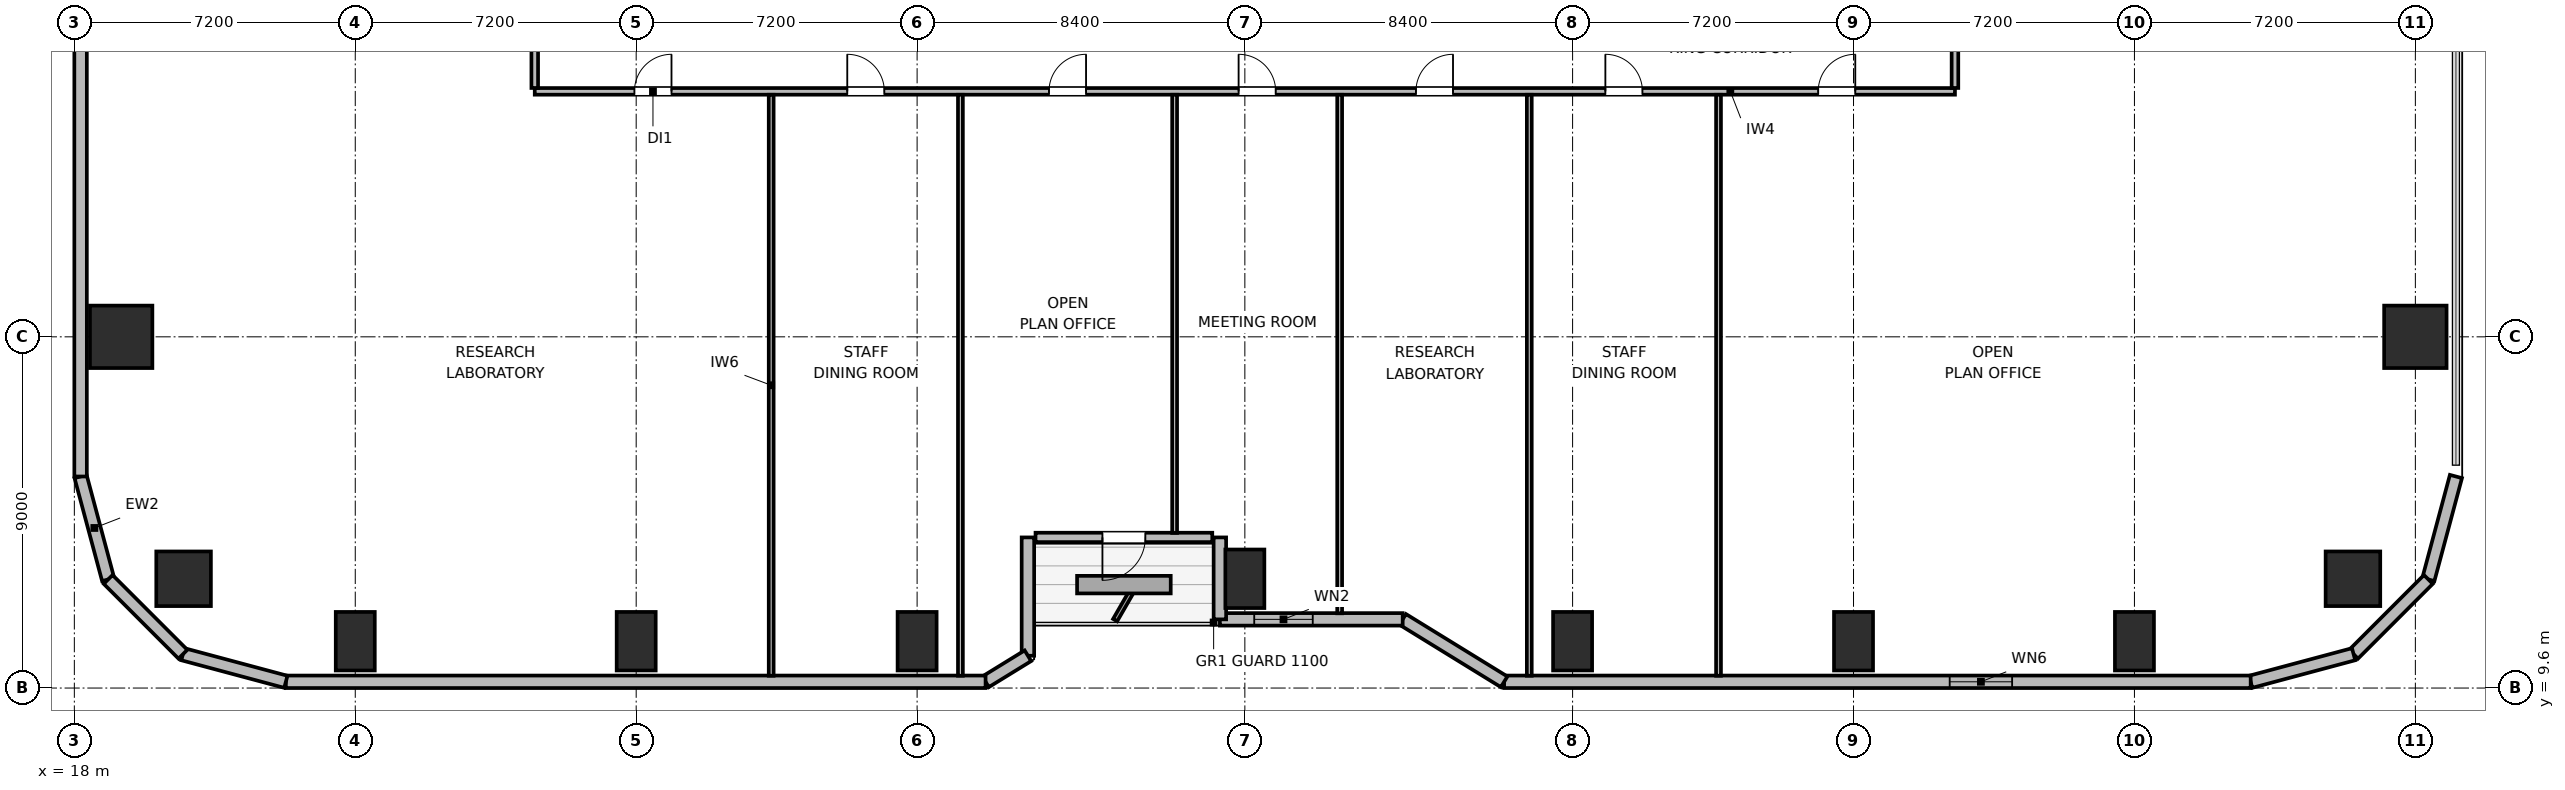
"""IFC4 building model, lengths in metres.
Left out: names, types, materials, properties, quantities, classifications, styles, units other than length and angle.
Written with IfcOpenShell. Run it as: python <this file> out.ifc"""

import sys

from ifc_helpers import new_model, si_unit, direction, frame, frame_2d, origin, origin_2d, place, context, subcontext, project, spatial, rectangle, circle, extrude, element, fill, save


model = new_model("IFC4")
c1 = context("Model", 3, precision=1e-05, world=origin(), true_north=direction((0.0, 1.0)))
c2 = subcontext(c1, "Body", "Model", "MODEL_VIEW")
j1 = project(units=[si_unit("LENGTHUNIT", "METRE"), si_unit("PLANEANGLEUNIT", "RADIAN")], contexts=[c1])
p1 = place(None, origin())
s1 = spatial("IfcSite", under=j1, at=p1, CompositionType="ELEMENT")
p2 = place(p1, origin())
s2 = spatial("IfcBuilding", under=s1, at=p2, CompositionType="ELEMENT")
p3 = place(p2, frame((0.0, 0.0, 48.9)))
s3 = spatial("IfcBuildingStorey", under=s2, at=p3, CompositionType="ELEMENT", Elevation=48.9)
for number, where, z_axis, x_axis in (
    (1, (20.8, 12.4, 0.0), (0.0, 0.0, 1.0), (1.0, 0.0, 0.0)),
    (2, (76.4, 12.4, 0.0), (0.0, 0.0, 1.0), (1.0, 0.0, 0.0)),
):
    element("IfcColumn", number, at=place(p3, frame(where, z_axis=z_axis, x_axis=x_axis)), inside=s3, PredefinedType="COLUMN", context=c2, shape_type="SweptSolid", body=[
        extrude(circle(Radius=0.7, at=origin_2d()), origin(), (0.0, 0.0, 1.0), 3.9),
    ])
for number, where, z_axis, x_axis in (
    (3, (25.2, 10.8, 0.0), (0.0, 0.0, 1.0), (1.0, 0.0, 0.0)),
    (4, (32.4, 10.8, 0.0), (0.0, 0.0, 1.0), (1.0, 0.0, 0.0)),
    (5, (39.6, 10.8, 0.0), (0.0, 0.0, 1.0), (1.0, 0.0, 0.0)),
    (6, (48.0, 12.4, 0.0), (0.0, 0.0, 1.0), (1.0, 0.0, 0.0)),
    (7, (56.4, 10.8, 0.0), (0.0, 0.0, 1.0), (1.0, 0.0, 0.0)),
    (8, (63.6, 10.8, 0.0), (0.0, 0.0, 1.0), (1.0, 0.0, 0.0)),
    (9, (70.8, 10.8, 0.0), (0.0, 0.0, 1.0), (1.0, 0.0, 0.0)),
):
    element("IfcColumn", number, at=place(p3, frame(where, z_axis=z_axis, x_axis=x_axis)), inside=s3, PredefinedType="COLUMN", context=c2, shape_type="SweptSolid", body=[
        extrude(rectangle(XDim=1.0, YDim=1.5, at=origin_2d()), origin(), (0.0, 0.0, 1.0), 3.9),
    ])
for number, where, z_axis, x_axis in (
    (10, (19.2, 18.6, 0.0), (0.0, 0.0, 1.0), (1.0, 0.0, 0.0)),
    (11, (78.0, 18.6, 0.0), (0.0, 0.0, 1.0), (1.0, 0.0, 0.0)),
):
    element("IfcColumn", number, at=place(p3, frame(where, z_axis=z_axis, x_axis=x_axis)), inside=s3, PredefinedType="COLUMN", context=c2, shape_type="SweptSolid", body=[
        extrude(rectangle(XDim=1.6, YDim=1.6, at=origin_2d()), origin(), (0.0, 0.0, 1.0), 3.9),
    ])
p4 = place(p3, frame((18.866, 12.383, 0.0), z_axis=(0.0, 0.0, 1.0), x_axis=(-0.25869736047, 0.965958423373, 0.0)))
e12 = element("IfcWall", 12, at=p4, inside=s3, PredefinedType="SOLIDWALL", context=c2, shape_type="SweptSolid", body=[
    extrude(rectangle(XDim=2.731, YDim=0.32, at=frame_2d((1.366, 0.0))), origin(), (0.0, 0.0, 1.0), 3.64),
])
p5 = place(p3, frame((18.16, 15.021, 0.0), z_axis=(0.0, 0.0, 1.0), x_axis=(0.0, 1.0, 0.0)))
e13 = element("IfcWall", 13, at=p5, inside=s3, PredefinedType="SOLIDWALL", context=c2, shape_type="SweptSolid", body=[
    extrude(rectangle(XDim=14.219, YDim=0.32, at=frame_2d((7.109, 0.0))), origin(), (0.0, 0.0, 1.0), 3.64),
])
p6 = place(p3, frame((79.04, 15.021, 0.0), z_axis=(0.0, 0.0, 1.0), x_axis=(-0.25869736047, -0.965958423373, 0.0)))
e14 = element("IfcWall", 14, at=p6, inside=s3, PredefinedType="SOLIDWALL", context=c2, shape_type="SweptSolid", body=[
    extrude(rectangle(XDim=2.731, YDim=0.32, at=frame_2d((1.366, 0.0))), origin(), (0.0, 0.0, 1.0), 3.64),
])
p7 = place(p3, frame((78.333, 12.383, 0.0), z_axis=(0.0, 0.0, 1.0), x_axis=(-0.707106781187, -0.707106781187, 0.0)))
e15 = element("IfcWall", 15, at=p7, inside=s3, PredefinedType="SOLIDWALL", context=c2, shape_type="SweptSolid", body=[
    extrude(rectangle(XDim=2.71, YDim=0.32, at=frame_2d((1.355, 0.0))), origin(), (0.0, 0.0, 1.0), 3.64),
])
p8 = place(p3, frame((76.417, 10.467, 0.0), z_axis=(0.0, 0.0, 1.0), x_axis=(-0.965964405026, -0.25867502435, 0.0)))
e16 = element("IfcWall", 16, at=p8, inside=s3, PredefinedType="SOLIDWALL", context=c2, shape_type="SweptSolid", body=[
    extrude(rectangle(XDim=2.731, YDim=0.32, at=frame_2d((1.366, 0.0))), origin(), (0.0, 0.0, 1.0), 3.64),
])
p9 = place(p3, frame((73.779, 9.76, 0.0), z_axis=(0.0, 0.0, 1.0), x_axis=(-1.0, 0.0, 0.0)))
e17 = element("IfcWall", 17, at=p9, inside=s3, PredefinedType="SOLIDWALL", context=c2, shape_type="SweptSolid", body=[
    extrude(rectangle(XDim=19.134, YDim=0.32, at=frame_2d((9.567, 0.0))), origin(), (0.0, 0.0, 1.0), 3.64),
])
p10 = place(p9, frame((6.114, 0.0, 0.85)))
e18 = element("IfcOpeningElement", 18, at=p10, cuts=e17, PredefinedType="OPENING", context=c2, shape_type="SweptSolid", body=[
    extrude(rectangle(XDim=1.6, YDim=1.0, at=frame_2d((0.8, 0.5))), frame((0.0, 0.17, 0.0), z_axis=(0.0, -1.0, 0.0), x_axis=(1.0, 0.0, 0.0)), (0.0, 0.0, 1.0), 0.34),
])
p11 = place(p3, frame((54.645, 9.76, 0.0), z_axis=(0.0, 0.0, 1.0), x_axis=(-0.851630857047, 0.524142044989, 0.0)))
e19 = element("IfcWall", 19, at=p11, inside=s3, PredefinedType="SOLIDWALL", context=c2, shape_type="SweptSolid", body=[
    extrude(rectangle(XDim=3.053, YDim=0.32, at=frame_2d((1.526, 0.0))), origin(), (0.0, 0.0, 1.0), 2.875),
])
p12 = place(p3, frame((52.045, 11.36, 0.0), z_axis=(0.0, 0.0, 1.0), x_axis=(-1.0, 0.0, 0.0)))
e20 = element("IfcWall", 20, at=p12, inside=s3, PredefinedType="SOLIDWALL", context=c2, shape_type="SweptSolid", body=[
    extrude(rectangle(XDim=4.685, YDim=0.32, at=frame_2d((2.343, 0.0))), origin(), (0.0, 0.0, 1.0), 2.875),
])
p13 = place(p12, frame((2.305, 0.0, 0.85)))
e21 = element("IfcOpeningElement", 21, at=p13, cuts=e20, PredefinedType="OPENING", context=c2, shape_type="SweptSolid", body=[
    extrude(rectangle(XDim=1.5, YDim=1.1, at=frame_2d((0.75, 0.55))), frame((0.0, 0.17, 0.0), z_axis=(0.0, -1.0, 0.0), x_axis=(1.0, 0.0, 0.0)), (0.0, 0.0, 1.0), 0.34),
])
p14 = place(p3, frame((47.36, 11.36, 0.0), z_axis=(0.0, 0.0, 1.0), x_axis=(0.0, 1.0, 0.0)))
e22 = element("IfcWall", 22, at=p14, inside=s3, PredefinedType="SOLIDWALL", context=c2, shape_type="SweptSolid", body=[
    extrude(rectangle(XDim=2.1, YDim=0.32, at=frame_2d((1.05, 0.0))), origin(), (0.0, 0.0, 1.0), 2.875),
])
p15 = place(p3, frame((47.165, 13.46, 0.0), z_axis=(0.0, 0.0, 1.0), x_axis=(-1.0, 0.0, 0.0)))
e23 = element("IfcWall", 23, at=p15, inside=s3, PredefinedType="SOLIDWALL", context=c2, shape_type="SweptSolid", body=[
    extrude(rectangle(XDim=4.53, YDim=0.24, at=frame_2d((2.265, 0.0))), origin(), (0.0, 0.0, 1.0), 3.64),
])
p16 = place(p15, frame((1.715, 0.0, 0.0)))
e24 = element("IfcOpeningElement", 24, at=p16, cuts=e23, PredefinedType="OPENING", context=c2, shape_type="SweptSolid", body=[
    extrude(rectangle(XDim=1.1, YDim=2.04, at=frame_2d((0.55, 1.02))), frame((0.0, 0.13, 0.0), z_axis=(0.0, -1.0, 0.0), x_axis=(1.0, 0.0, 0.0)), (0.0, 0.0, 1.0), 0.26),
])
p17 = place(p3, frame((42.44, 13.46, 0.0), z_axis=(0.0, 0.0, 1.0), x_axis=(0.0, -1.0, 0.0)))
e25 = element("IfcWall", 25, at=p17, inside=s3, PredefinedType="SOLIDWALL", context=c2, shape_type="SweptSolid", body=[
    extrude(rectangle(XDim=3.032, YDim=0.32, at=frame_2d((1.516, 0.0))), origin(), (0.0, 0.0, 1.0), 2.875),
])
p18 = place(p3, frame((42.44, 10.427, 0.0), z_axis=(0.0, 0.0, 1.0), x_axis=(-0.851776724646, -0.523904964045, 0.0)))
e26 = element("IfcWall", 26, at=p18, inside=s3, PredefinedType="SOLIDWALL", context=c2, shape_type="SweptSolid", body=[
    extrude(rectangle(XDim=1.274, YDim=0.32, at=frame_2d((0.637, 0.0))), origin(), (0.0, 0.0, 1.0), 3.64),
])
p19 = place(p3, frame((41.355, 9.76, 0.0), z_axis=(0.0, 0.0, 1.0), x_axis=(-1.0, 0.0, 0.0)))
e27 = element("IfcWall", 27, at=p19, inside=s3, PredefinedType="SOLIDWALL", context=c2, shape_type="SweptSolid", body=[
    extrude(rectangle(XDim=17.934, YDim=0.32, at=frame_2d((8.967, 0.0))), origin(), (0.0, 0.0, 1.0), 3.64),
])
p20 = place(p3, frame((23.421, 9.76, 0.0), z_axis=(0.0, 0.0, 1.0), x_axis=(-0.965964405026, 0.25867502435, 0.0)))
e28 = element("IfcWall", 28, at=p20, inside=s3, PredefinedType="SOLIDWALL", context=c2, shape_type="SweptSolid", body=[
    extrude(rectangle(XDim=2.731, YDim=0.32, at=frame_2d((1.366, 0.0))), origin(), (0.0, 0.0, 1.0), 3.64),
])
p21 = place(p3, frame((20.783, 10.467, 0.0), z_axis=(0.0, 0.0, 1.0), x_axis=(-0.707106781187, 0.707106781187, 0.0)))
e29 = element("IfcWall", 29, at=p21, inside=s3, PredefinedType="SOLIDWALL", context=c2, shape_type="SweptSolid", body=[
    extrude(rectangle(XDim=2.71, YDim=0.32, at=frame_2d((1.355, 0.0))), origin(), (0.0, 0.0, 1.0), 3.64),
])
p22 = place(p3, frame((29.8, 24.89, 0.0), z_axis=(0.0, 0.0, 1.0), x_axis=(1.0, 0.0, 0.0)))
e30 = element("IfcWall", 30, at=p22, inside=s3, PredefinedType="PARTITIONING", context=c2, shape_type="SweptSolid", body=[
    extrude(rectangle(XDim=36.4, YDim=0.17, at=frame_2d((18.2, 0.0))), origin(), (0.0, 0.0, 1.0), 3.64),
])
p23 = place(p22, frame((2.555, 0.0, 0.0)))
e31 = element("IfcOpeningElement", 31, at=p23, cuts=e30, PredefinedType="OPENING", context=c2, shape_type="SweptSolid", body=[
    extrude(rectangle(XDim=0.95, YDim=2.04, at=frame_2d((0.475, 1.02))), frame((0.0, 0.095, 0.0), z_axis=(0.0, -1.0, 0.0), x_axis=(1.0, 0.0, 0.0)), (0.0, 0.0, 1.0), 0.19),
])
p24 = place(p22, frame((8.01, 0.0, 0.0)))
e32 = element("IfcOpeningElement", 32, at=p24, cuts=e30, PredefinedType="OPENING", context=c2, shape_type="SweptSolid", body=[
    extrude(rectangle(XDim=0.95, YDim=2.04, at=frame_2d((0.475, 1.02))), frame((0.0, 0.095, 0.0), z_axis=(0.0, -1.0, 0.0), x_axis=(1.0, 0.0, 0.0)), (0.0, 0.0, 1.0), 0.19),
])
p25 = place(p22, frame((13.18, 0.0, 0.0)))
e33 = element("IfcOpeningElement", 33, at=p25, cuts=e30, PredefinedType="OPENING", context=c2, shape_type="SweptSolid", body=[
    extrude(rectangle(XDim=0.95, YDim=2.04, at=frame_2d((0.475, 1.02))), frame((0.0, 0.095, 0.0), z_axis=(0.0, -1.0, 0.0), x_axis=(1.0, 0.0, 0.0)), (0.0, 0.0, 1.0), 0.19),
])
p26 = place(p22, frame((18.04, 0.0, 0.0)))
e34 = element("IfcOpeningElement", 34, at=p26, cuts=e30, PredefinedType="OPENING", context=c2, shape_type="SweptSolid", body=[
    extrude(rectangle(XDim=0.95, YDim=2.04, at=frame_2d((0.475, 1.02))), frame((0.0, 0.095, 0.0), z_axis=(0.0, -1.0, 0.0), x_axis=(1.0, 0.0, 0.0)), (0.0, 0.0, 1.0), 0.19),
])
p27 = place(p22, frame((22.585, 0.0, 0.0)))
e35 = element("IfcOpeningElement", 35, at=p27, cuts=e30, PredefinedType="OPENING", context=c2, shape_type="SweptSolid", body=[
    extrude(rectangle(XDim=0.95, YDim=2.04, at=frame_2d((0.475, 1.02))), frame((0.0, 0.095, 0.0), z_axis=(0.0, -1.0, 0.0), x_axis=(1.0, 0.0, 0.0)), (0.0, 0.0, 1.0), 0.19),
])
p28 = place(p22, frame((27.44, 0.0, 0.0)))
e36 = element("IfcOpeningElement", 36, at=p28, cuts=e30, PredefinedType="OPENING", context=c2, shape_type="SweptSolid", body=[
    extrude(rectangle(XDim=0.95, YDim=2.04, at=frame_2d((0.475, 1.02))), frame((0.0, 0.095, 0.0), z_axis=(0.0, -1.0, 0.0), x_axis=(1.0, 0.0, 0.0)), (0.0, 0.0, 1.0), 0.19),
])
p29 = place(p22, frame((32.895, 0.0, 0.0)))
e37 = element("IfcOpeningElement", 37, at=p29, cuts=e30, PredefinedType="OPENING", context=c2, shape_type="SweptSolid", body=[
    extrude(rectangle(XDim=0.95, YDim=2.04, at=frame_2d((0.475, 1.02))), frame((0.0, 0.095, 0.0), z_axis=(0.0, -1.0, 0.0), x_axis=(1.0, 0.0, 0.0)), (0.0, 0.0, 1.0), 0.19),
])
p30 = place(p3, frame((29.8, 24.977, 0.0), z_axis=(0.0, 0.0, 1.0), x_axis=(0.0, 1.0, 0.0)))
e38 = element("IfcWall", 38, at=p30, inside=s3, PredefinedType="PARTITIONING", context=c2, shape_type="SweptSolid", body=[
    extrude(rectangle(XDim=22.046, YDim=0.17, at=frame_2d((11.023, 0.0))), origin(), (0.0, 0.0, 1.0), 3.64),
])
p31 = place(p30, frame((10.548, 0.0, 0.0)))
e39 = element("IfcOpeningElement", 39, at=p31, cuts=e38, PredefinedType="OPENING", context=c2, shape_type="SweptSolid", body=[
    extrude(rectangle(XDim=0.95, YDim=2.04, at=frame_2d((0.475, 1.02))), frame((0.0, 0.095, 0.0), z_axis=(0.0, -1.0, 0.0), x_axis=(1.0, 0.0, 0.0)), (0.0, 0.0, 1.0), 0.19),
])
p32 = place(p3, frame((66.2, 24.977, 0.0), z_axis=(0.0, 0.0, 1.0), x_axis=(0.0, 1.0, 0.0)))
e40 = element("IfcWall", 40, at=p32, inside=s3, PredefinedType="PARTITIONING", context=c2, shape_type="SweptSolid", body=[
    extrude(rectangle(XDim=22.046, YDim=0.17, at=frame_2d((11.023, 0.0))), origin(), (0.0, 0.0, 1.0), 3.64),
])
p33 = place(p32, frame((4.493, 0.0, 0.0)))
e41 = element("IfcOpeningElement", 41, at=p33, cuts=e40, PredefinedType="OPENING", context=c2, shape_type="SweptSolid", body=[
    extrude(rectangle(XDim=0.95, YDim=2.04, at=frame_2d((0.475, 1.02))), frame((0.0, 0.095, 0.0), z_axis=(0.0, -1.0, 0.0), x_axis=(1.0, 0.0, 0.0)), (0.0, 0.0, 1.0), 0.19),
])
p34 = place(p32, frame((15.603, 0.0, 0.0)))
e42 = element("IfcOpeningElement", 42, at=p34, cuts=e40, PredefinedType="OPENING", context=c2, shape_type="SweptSolid", body=[
    extrude(rectangle(XDim=0.95, YDim=2.04, at=frame_2d((0.475, 1.02))), frame((0.0, 0.095, 0.0), z_axis=(0.0, -1.0, 0.0), x_axis=(1.0, 0.0, 0.0)), (0.0, 0.0, 1.0), 0.19),
])
p35 = place(p3, frame((35.86, 9.915, 0.0), z_axis=(0.0, 0.0, 1.0), x_axis=(0.0, 1.0, 0.0)))
e43 = element("IfcWall", 43, at=p35, inside=s3, PredefinedType="PARTITIONING", context=c2, shape_type="SweptSolid", body=[
    extrude(rectangle(XDim=14.888, YDim=0.125, at=frame_2d((7.444, 0.0))), origin(), (0.0, 0.0, 1.0), 3.64),
])
p36 = place(p3, frame((40.71, 9.915, 0.0), z_axis=(0.0, 0.0, 1.0), x_axis=(0.0, 1.0, 0.0)))
e44 = element("IfcWall", 44, at=p36, inside=s3, PredefinedType="PARTITIONING", context=c2, shape_type="SweptSolid", body=[
    extrude(rectangle(XDim=14.888, YDim=0.125, at=frame_2d((7.444, 0.0))), origin(), (0.0, 0.0, 1.0), 3.003),
])
p37 = place(p3, frame((46.2, 13.575, 0.0), z_axis=(0.0, 0.0, 1.0), x_axis=(0.0, 1.0, 0.0)))
e45 = element("IfcWall", 45, at=p37, inside=s3, PredefinedType="PARTITIONING", context=c2, shape_type="SweptSolid", body=[
    extrude(rectangle(XDim=11.228, YDim=0.125, at=frame_2d((5.614, 0.0))), origin(), (0.0, 0.0, 1.0), 3.64),
])
p38 = place(p3, frame((50.43, 11.515, 0.0), z_axis=(0.0, 0.0, 1.0), x_axis=(0.0, 1.0, 0.0)))
e46 = element("IfcWall", 46, at=p38, inside=s3, PredefinedType="PARTITIONING", context=c2, shape_type="SweptSolid", body=[
    extrude(rectangle(XDim=13.288, YDim=0.125, at=frame_2d((6.644, 0.0))), origin(), (0.0, 0.0, 1.0), 3.64),
])
p39 = place(p3, frame((55.29, 9.915, 0.0), z_axis=(0.0, 0.0, 1.0), x_axis=(0.0, 1.0, 0.0)))
e47 = element("IfcWall", 47, at=p39, inside=s3, PredefinedType="PARTITIONING", context=c2, shape_type="SweptSolid", body=[
    extrude(rectangle(XDim=14.888, YDim=0.125, at=frame_2d((7.444, 0.0))), origin(), (0.0, 0.0, 1.0), 3.003),
])
p40 = place(p3, frame((60.14, 9.915, 0.0), z_axis=(0.0, 0.0, 1.0), x_axis=(0.0, 1.0, 0.0)))
e48 = element("IfcWall", 48, at=p40, inside=s3, PredefinedType="PARTITIONING", context=c2, shape_type="SweptSolid", body=[
    extrude(rectangle(XDim=14.888, YDim=0.125, at=frame_2d((7.444, 0.0))), origin(), (0.0, 0.0, 1.0), 3.64),
])
p41 = place(p10, origin())
e49 = element("IfcWindow", 49, at=p41, inside=s3, PartitioningType="SINGLE_PANEL", PredefinedType="WINDOW", context=c2, shape_type="SweptSolid", body=[
    extrude(rectangle(XDim=1.6, YDim=1.0, at=frame_2d((0.8, 0.5))), frame((0.0, 0.03, 0.0), z_axis=(0.0, -1.0, 0.0), x_axis=(1.0, 0.0, 0.0)), (0.0, 0.0, 1.0), 0.06),
])
fill(e18, e49)
p42 = place(p13, origin())
e50 = element("IfcWindow", 50, at=p42, inside=s3, PartitioningType="SINGLE_PANEL", PredefinedType="WINDOW", context=c2, shape_type="SweptSolid", body=[
    extrude(rectangle(XDim=1.5, YDim=1.1, at=frame_2d((0.75, 0.55))), frame((0.0, 0.03, 0.0), z_axis=(0.0, -1.0, 0.0), x_axis=(1.0, 0.0, 0.0)), (0.0, 0.0, 1.0), 0.06),
])
fill(e21, e50)
p43 = place(p16, origin())
e51 = element("IfcDoor", 51, at=p43, inside=s3, OperationType="SINGLE_SWING_RIGHT", PredefinedType="DOOR", context=c2, shape_type="SweptSolid", body=[
    extrude(rectangle(XDim=1.1, YDim=2.04, at=frame_2d((0.55, 1.02))), frame((0.0, 0.025, 0.0), z_axis=(0.0, -1.0, 0.0), x_axis=(1.0, 0.0, 0.0)), (0.0, 0.0, 1.0), 0.05),
])
fill(e24, e51)
p44 = place(p23, origin())
e52 = element("IfcDoor", 52, at=p44, inside=s3, OperationType="SINGLE_SWING_RIGHT", PredefinedType="DOOR", context=c2, shape_type="SweptSolid", body=[
    extrude(rectangle(XDim=0.95, YDim=2.04, at=frame_2d((0.475, 1.02))), frame((0.0, 0.025, 0.0), z_axis=(0.0, -1.0, 0.0), x_axis=(1.0, 0.0, 0.0)), (0.0, 0.0, 1.0), 0.05),
])
fill(e31, e52)
p45 = place(p24, origin())
e53 = element("IfcDoor", 53, at=p45, inside=s3, OperationType="SINGLE_SWING_LEFT", PredefinedType="DOOR", context=c2, shape_type="SweptSolid", body=[
    extrude(rectangle(XDim=0.95, YDim=2.04, at=frame_2d((0.475, 1.02))), frame((0.0, 0.025, 0.0), z_axis=(0.0, -1.0, 0.0), x_axis=(1.0, 0.0, 0.0)), (0.0, 0.0, 1.0), 0.05),
])
fill(e32, e53)
p46 = place(p25, origin())
e54 = element("IfcDoor", 54, at=p46, inside=s3, OperationType="SINGLE_SWING_RIGHT", PredefinedType="DOOR", context=c2, shape_type="SweptSolid", body=[
    extrude(rectangle(XDim=0.95, YDim=2.04, at=frame_2d((0.475, 1.02))), frame((0.0, 0.025, 0.0), z_axis=(0.0, -1.0, 0.0), x_axis=(1.0, 0.0, 0.0)), (0.0, 0.0, 1.0), 0.05),
])
fill(e33, e54)
p47 = place(p26, origin())
e55 = element("IfcDoor", 55, at=p47, inside=s3, OperationType="SINGLE_SWING_LEFT", PredefinedType="DOOR", context=c2, shape_type="SweptSolid", body=[
    extrude(rectangle(XDim=0.95, YDim=2.04, at=frame_2d((0.475, 1.02))), frame((0.0, 0.025, 0.0), z_axis=(0.0, -1.0, 0.0), x_axis=(1.0, 0.0, 0.0)), (0.0, 0.0, 1.0), 0.05),
])
fill(e34, e55)
p48 = place(p27, origin())
e56 = element("IfcDoor", 56, at=p48, inside=s3, OperationType="SINGLE_SWING_RIGHT", PredefinedType="DOOR", context=c2, shape_type="SweptSolid", body=[
    extrude(rectangle(XDim=0.95, YDim=2.04, at=frame_2d((0.475, 1.02))), frame((0.0, 0.025, 0.0), z_axis=(0.0, -1.0, 0.0), x_axis=(1.0, 0.0, 0.0)), (0.0, 0.0, 1.0), 0.05),
])
fill(e35, e56)
p49 = place(p28, origin())
e57 = element("IfcDoor", 57, at=p49, inside=s3, OperationType="SINGLE_SWING_LEFT", PredefinedType="DOOR", context=c2, shape_type="SweptSolid", body=[
    extrude(rectangle(XDim=0.95, YDim=2.04, at=frame_2d((0.475, 1.02))), frame((0.0, 0.025, 0.0), z_axis=(0.0, -1.0, 0.0), x_axis=(1.0, 0.0, 0.0)), (0.0, 0.0, 1.0), 0.05),
])
fill(e36, e57)
p50 = place(p29, origin())
e58 = element("IfcDoor", 58, at=p50, inside=s3, OperationType="SINGLE_SWING_RIGHT", PredefinedType="DOOR", context=c2, shape_type="SweptSolid", body=[
    extrude(rectangle(XDim=0.95, YDim=2.04, at=frame_2d((0.475, 1.02))), frame((0.0, 0.025, 0.0), z_axis=(0.0, -1.0, 0.0), x_axis=(1.0, 0.0, 0.0)), (0.0, 0.0, 1.0), 0.05),
])
fill(e37, e58)
save(model, sys.argv[1])
